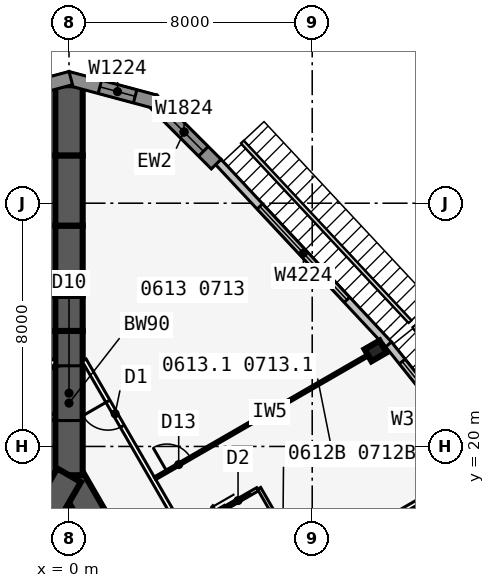
"""IFC4 building model, lengths in metres.
Left out: names, types, materials, properties, quantities, classifications, styles, units other than length and angle.
Written with IfcOpenShell. Run it as: python <this file> out.ifc"""

import sys

from ifc_helpers import new_model, si_unit, direction, frame, frame_2d, origin, origin_2d, place, context, subcontext, project, spatial, polyline, rectangle, i_section, outline, extrude, element, fill, save


model = new_model("IFC4")
c1 = context("Model", 3, precision=1e-05, world=origin(), true_north=direction((0.0, 1.0)))
c2 = subcontext(c1, "Body", "Model", "MODEL_VIEW")
j1 = project(units=[si_unit("LENGTHUNIT", "METRE"), si_unit("PLANEANGLEUNIT", "RADIAN")], contexts=[c1])
p1 = place(None, origin())
s1 = spatial("IfcSite", under=j1, at=p1, CompositionType="ELEMENT")
p2 = place(p1, origin())
s2 = spatial("IfcBuilding", under=s1, at=p2, CompositionType="ELEMENT")
p3 = place(p2, frame((0.0, 0.0, 31.9)))
s3 = spatial("IfcBuildingStorey", under=s2, at=p3, CompositionType="ELEMENT", Elevation=31.9)
p4 = place(p3, frame((16.5, -9.526, 0.0), z_axis=(0.0, 0.0, 1.0), x_axis=(-0.499999749417, 0.866025548458, 0.0)))
e1 = element("IfcWall", 1, at=p4, inside=s3, PredefinedType="SHEAR", context=c2, shape_type="SweptSolid", body=[
    extrude(rectangle(XDim=33.0, YDim=0.9, at=frame_2d((16.5, 0.0))), origin(), (0.0, 0.0, 1.0), 3.4),
])
p5 = place(p4, frame((14.15, 0.0, 0.0)))
e2 = element("IfcOpeningElement", 2, at=p5, cuts=e1, PredefinedType="OPENING", context=c2, shape_type="SweptSolid", body=[
    extrude(rectangle(XDim=1.8, YDim=2.13, at=frame_2d((0.9, 1.065))), frame((0.0, 0.46, 0.0), z_axis=(0.0, -1.0, 0.0), x_axis=(1.0, 0.0, 0.0)), (0.0, 0.0, 1.0), 0.92),
])
p6 = place(p4, frame((12.6, 0.0, 0.0)))
e3 = element("IfcOpeningElement", 3, at=p6, cuts=e1, PredefinedType="OPENING", context=c2, shape_type="SweptSolid", body=[
    extrude(rectangle(XDim=1.0, YDim=2.13, at=frame_2d((0.5, 1.065))), frame((0.0, 0.46, 0.0), z_axis=(0.0, -1.0, 0.0), x_axis=(1.0, 0.0, 0.0)), (0.0, 0.0, 1.0), 0.92),
])
p7 = place(p3, frame((0.0, 19.052, 0.0), z_axis=(0.0, 0.0, 1.0), x_axis=(-0.499999749417, -0.866025548458, 0.0)))
e4 = element("IfcWall", 4, at=p7, inside=s3, PredefinedType="SHEAR", context=c2, shape_type="SweptSolid", body=[
    extrude(rectangle(XDim=33.0, YDim=0.9, at=frame_2d((16.5, 0.0))), origin(), (0.0, 0.0, 1.0), 3.4),
])
p8 = place(p7, frame((14.15, 0.0, 0.0)))
e5 = element("IfcOpeningElement", 5, at=p8, cuts=e4, PredefinedType="OPENING", context=c2, shape_type="SweptSolid", body=[
    extrude(rectangle(XDim=1.8, YDim=2.13, at=frame_2d((0.9, 1.065))), frame((0.0, 0.46, 0.0), z_axis=(0.0, -1.0, 0.0), x_axis=(1.0, 0.0, 0.0)), (0.0, 0.0, 1.0), 0.92),
])
p9 = place(p7, frame((12.6, 0.0, 0.0)))
e6 = element("IfcOpeningElement", 6, at=p9, cuts=e4, PredefinedType="OPENING", context=c2, shape_type="SweptSolid", body=[
    extrude(rectangle(XDim=1.0, YDim=2.13, at=frame_2d((0.5, 1.065))), frame((0.0, 0.46, 0.0), z_axis=(0.0, -1.0, 0.0), x_axis=(1.0, 0.0, 0.0)), (0.0, 0.0, 1.0), 0.92),
])
p10 = place(p3, frame((0.0, 19.052, 0.0), z_axis=(0.0, 0.0, 1.0), x_axis=(0.0, 1.0, 0.0)))
e7 = element("IfcWall", 7, at=p10, inside=s3, PredefinedType="SHEAR", context=c2, shape_type="SweptSolid", body=[
    extrude(rectangle(XDim=4.746, YDim=0.9, at=frame_2d((2.373, 0.0))), origin(), (0.0, 0.0, 1.0), 3.4),
])
p11 = place(p10, frame((1.8, 0.0, 0.0)))
e8 = element("IfcOpeningElement", 8, at=p11, cuts=e7, PredefinedType="OPENING", context=c2, shape_type="SweptSolid", body=[
    extrude(rectangle(XDim=1.8, YDim=2.13, at=frame_2d((0.9, 1.065))), frame((0.0, 0.46, 0.0), z_axis=(0.0, -1.0, 0.0), x_axis=(1.0, 0.0, 0.0)), (0.0, 0.0, 1.0), 0.92),
])
p12 = place(p3, frame((0.0, 23.799, 0.0), z_axis=(0.0, 0.0, 1.0), x_axis=(0.0, 1.0, 0.0)))
e9 = element("IfcWall", 9, at=p12, inside=s3, PredefinedType="SHEAR", context=c2, shape_type="SweptSolid", body=[
    extrude(rectangle(XDim=1.155, YDim=0.9, at=frame_2d((0.577, 0.0))), origin(), (0.0, 0.0, 1.0), 3.4),
])
p13 = place(p3, frame((0.0, 24.953, 0.0), z_axis=(0.0, 0.0, 1.0), x_axis=(0.0, 1.0, 0.0)))
e10 = element("IfcWall", 10, at=p13, inside=s3, PredefinedType="SHEAR", context=c2, shape_type="SweptSolid", body=[
    extrude(rectangle(XDim=2.309, YDim=0.9, at=frame_2d((1.155, 0.0))), origin(), (0.0, 0.0, 1.0), 3.4),
])
p14 = place(p3, frame((0.0, 27.263, 0.0), z_axis=(0.0, 0.0, 1.0), x_axis=(0.0, 1.0, 0.0)))
e11 = element("IfcWall", 11, at=p14, inside=s3, PredefinedType="SHEAR", context=c2, shape_type="SweptSolid", body=[
    extrude(rectangle(XDim=2.31, YDim=0.9, at=frame_2d((1.155, 0.0))), origin(), (0.0, 0.0, 1.0), 3.4),
])
p15 = place(p3, frame((0.0, 29.572, 0.0), z_axis=(0.0, 0.0, 1.0), x_axis=(0.0, 1.0, 0.0)))
e12 = element("IfcWall", 12, at=p15, inside=s3, PredefinedType="SHEAR", context=c2, shape_type="SweptSolid", body=[
    extrude(rectangle(XDim=2.309, YDim=0.9, at=frame_2d((1.155, 0.0))), origin(), (0.0, 0.0, 1.0), 3.4),
])
p16 = place(p3, frame((10.083, 23.142, 0.0), z_axis=(0.0, 0.0, 1.0), x_axis=(-0.5, 0.866025403784, 0.0)))
e13 = element("IfcColumn", 13, at=p16, inside=s3, PredefinedType="COLUMN", context=c2, shape_type="SweptSolid", body=[
    extrude(i_section(OverallWidth=0.455, OverallDepth=0.569, WebThickness=0.078, FlangeThickness=0.125, at=origin_2d()), origin(), (0.0, 0.0, 1.0), 3.4),
])
p17 = place(p3, frame((13.664, 19.414, 0.0), z_axis=(0.0, 0.0, 1.0), x_axis=(-0.624594965756, 0.780948864364, 0.0)))
e14 = element("IfcWall", 14, at=p17, inside=s3, PredefinedType="STANDARD", context=c2, shape_type="SweptSolid", body=[
    extrude(rectangle(XDim=5.058, YDim=0.25, at=frame_2d((2.529, 0.0))), origin(), (0.0, 0.0, 1.0), 3.235),
])
p18 = place(p17, frame((0.729, 0.0, 0.45)))
e15 = element("IfcOpeningElement", 15, at=p18, cuts=e14, PredefinedType="OPENING", context=c2, shape_type="SweptSolid", body=[
    extrude(rectangle(XDim=3.6, YDim=2.4, at=frame_2d((1.8, 1.2))), frame((0.0, 0.135, 0.0), z_axis=(0.0, -1.0, 0.0), x_axis=(1.0, 0.0, 0.0)), (0.0, 0.0, 1.0), 0.27),
])
p19 = place(p3, frame((10.511, 23.357, 0.0), z_axis=(0.0, 0.0, 1.0), x_axis=(-0.682289646561, 0.731081964075, 0.0)))
e16 = element("IfcWall", 16, at=p19, inside=s3, PredefinedType="STANDARD", context=c2, shape_type="SweptSolid", body=[
    extrude(rectangle(XDim=8.211, YDim=0.25, at=frame_2d((4.105, 0.0))), origin(), (0.0, 0.0, 1.0), 3.235),
])
p20 = place(p19, frame((2.006, 0.0, 0.45)))
e17 = element("IfcOpeningElement", 17, at=p20, cuts=e16, PredefinedType="OPENING", context=c2, shape_type="SweptSolid", body=[
    extrude(rectangle(XDim=4.2, YDim=2.4, at=frame_2d((2.1, 1.2))), frame((0.0, 0.135, 0.0), z_axis=(0.0, -1.0, 0.0), x_axis=(1.0, 0.0, 0.0)), (0.0, 0.0, 1.0), 0.27),
])
p21 = place(p3, frame((4.841, 29.286, 0.0), z_axis=(0.0, 0.0, 1.0), x_axis=(-0.707106781187, 0.707106781187, 0.0)))
e18 = element("IfcWall", 18, at=p21, inside=s3, PredefinedType="SOLIDWALL", context=c2, shape_type="SweptSolid", body=[
    extrude(rectangle(XDim=2.988, YDim=0.45, at=frame_2d((1.494, 0.0))), origin(), (0.0, 0.0, 1.0), 3.235),
])
p22 = place(p21, frame((0.594, 0.0, 0.45)))
e19 = element("IfcOpeningElement", 19, at=p22, cuts=e18, PredefinedType="OPENING", context=c2, shape_type="SweptSolid", body=[
    extrude(rectangle(XDim=1.8, YDim=2.4, at=frame_2d((0.9, 1.2))), frame((0.0, 0.235, 0.0), z_axis=(0.0, -1.0, 0.0), x_axis=(1.0, 0.0, 0.0)), (0.0, 0.0, 1.0), 0.47),
])
p23 = place(p3, frame((2.829, 31.341, 0.0), z_axis=(0.0, 0.0, 1.0), x_axis=(-0.965930548995, 0.258801419081, 0.0)))
e20 = element("IfcWall", 20, at=p23, inside=s3, PredefinedType="SOLIDWALL", context=c2, shape_type="SweptSolid", body=[
    extrude(outline(polyline([(2.989, 0.225), (2.929, 0.225), (2.438, 0.093), (2.402, 0.225), (0.0, 0.225), (0.0, -0.225), (2.989, -0.225), (2.989, 0.225)])), origin(), (0.0, 0.0, 1.0), 3.235),
])
p24 = place(p23, frame((0.676, 0.0, 0.45)))
e21 = element("IfcOpeningElement", 21, at=p24, cuts=e20, PredefinedType="OPENING", context=c2, shape_type="SweptSolid", body=[
    extrude(rectangle(XDim=1.2, YDim=2.4, at=frame_2d((0.6, 1.2))), frame((0.0, 0.235, 0.0), z_axis=(0.0, -1.0, 0.0), x_axis=(1.0, 0.0, 0.0)), (0.0, 0.0, 1.0), 0.47),
])
p25 = place(p3, frame((0.058, 32.114, 0.0), z_axis=(0.0, 0.0, 1.0), x_axis=(-0.965930548995, -0.258801419081, 0.0)))
e22 = element("IfcWall", 22, at=p25, inside=s3, PredefinedType="SOLIDWALL", context=c2, shape_type="SweptSolid", body=[
    extrude(outline(polyline([(2.989, 0.225), (0.586, 0.225), (0.551, 0.093), (0.059, 0.225), (0.0, 0.225), (0.0, -0.225), (2.989, -0.225), (2.989, 0.225)])), origin(), (0.0, 0.0, 1.0), 3.235),
])
p26 = place(p25, frame((1.113, 0.0, 0.45)))
e23 = element("IfcOpeningElement", 23, at=p26, cuts=e22, PredefinedType="OPENING", context=c2, shape_type="SweptSolid", body=[
    extrude(rectangle(XDim=1.2, YDim=2.4, at=frame_2d((0.6, 1.2))), frame((0.0, 0.235, 0.0), z_axis=(0.0, -1.0, 0.0), x_axis=(1.0, 0.0, 0.0)), (0.0, 0.0, 1.0), 0.47),
])
p27 = place(p3, frame((20.027, -10.985, 0.0), z_axis=(0.0, 0.0, 1.0), x_axis=(-0.500001677587, 0.866024435227, 0.0)))
e24 = element("IfcWall", 24, at=p27, inside=s3, PredefinedType="PARTITIONING", context=c2, shape_type="SweptSolid", body=[
    extrude(rectangle(XDim=39.054, YDim=0.15, at=frame_2d((19.527, 0.0))), origin(), (0.0, 0.0, 1.0), 3.235),
])
p28 = place(p27, frame((0.352, 0.0, 0.0)))
e25 = element("IfcOpeningElement", 25, at=p28, cuts=e24, PredefinedType="OPENING", context=c2, shape_type="SweptSolid", body=[
    extrude(rectangle(XDim=0.95, YDim=2.13, at=frame_2d((0.475, 1.065))), frame((0.0, 0.085, 0.0), z_axis=(0.0, -1.0, 0.0), x_axis=(1.0, 0.0, 0.0)), (0.0, 0.0, 1.0), 0.17),
])
p29 = place(p27, frame((5.952, 0.0, 0.0)))
e26 = element("IfcOpeningElement", 26, at=p29, cuts=e24, PredefinedType="OPENING", context=c2, shape_type="SweptSolid", body=[
    extrude(rectangle(XDim=0.95, YDim=2.13, at=frame_2d((0.475, 1.065))), frame((0.0, 0.085, 0.0), z_axis=(0.0, -1.0, 0.0), x_axis=(1.0, 0.0, 0.0)), (0.0, 0.0, 1.0), 0.17),
])
p30 = place(p27, frame((12.152, 0.0, 0.0)))
e27 = element("IfcOpeningElement", 27, at=p30, cuts=e24, PredefinedType="OPENING", context=c2, shape_type="SweptSolid", body=[
    extrude(rectangle(XDim=0.95, YDim=2.13, at=frame_2d((0.475, 1.065))), frame((0.0, 0.085, 0.0), z_axis=(0.0, -1.0, 0.0), x_axis=(1.0, 0.0, 0.0)), (0.0, 0.0, 1.0), 0.17),
])
p31 = place(p27, frame((15.952, 0.0, 0.0)))
e28 = element("IfcOpeningElement", 28, at=p31, cuts=e24, PredefinedType="OPENING", context=c2, shape_type="SweptSolid", body=[
    extrude(rectangle(XDim=0.95, YDim=2.13, at=frame_2d((0.475, 1.065))), frame((0.0, 0.085, 0.0), z_axis=(0.0, -1.0, 0.0), x_axis=(1.0, 0.0, 0.0)), (0.0, 0.0, 1.0), 0.17),
])
p32 = place(p27, frame((22.152, 0.0, 0.0)))
e29 = element("IfcOpeningElement", 29, at=p32, cuts=e24, PredefinedType="OPENING", context=c2, shape_type="SweptSolid", body=[
    extrude(rectangle(XDim=0.95, YDim=2.13, at=frame_2d((0.475, 1.065))), frame((0.0, 0.085, 0.0), z_axis=(0.0, -1.0, 0.0), x_axis=(1.0, 0.0, 0.0)), (0.0, 0.0, 1.0), 0.17),
])
p33 = place(p27, frame((25.952, 0.0, 0.0)))
e30 = element("IfcOpeningElement", 30, at=p33, cuts=e24, PredefinedType="OPENING", context=c2, shape_type="SweptSolid", body=[
    extrude(rectangle(XDim=0.95, YDim=2.13, at=frame_2d((0.475, 1.065))), frame((0.0, 0.085, 0.0), z_axis=(0.0, -1.0, 0.0), x_axis=(1.0, 0.0, 0.0)), (0.0, 0.0, 1.0), 0.17),
])
p34 = place(p27, frame((36.546, 0.0, 0.0)))
e31 = element("IfcOpeningElement", 31, at=p34, cuts=e24, PredefinedType="OPENING", context=c2, shape_type="SweptSolid", body=[
    extrude(rectangle(XDim=0.95, YDim=2.13, at=frame_2d((0.475, 1.065))), frame((0.0, 0.085, 0.0), z_axis=(0.0, -1.0, 0.0), x_axis=(1.0, 0.0, 0.0)), (0.0, 0.0, 1.0), 0.17),
])
p35 = place(p3, frame((5.329, 14.623, 0.0), z_axis=(0.0, 0.0, 1.0), x_axis=(0.866018409083, 0.500012114982, 0.0)))
e32 = element("IfcWall", 32, at=p35, inside=s3, PredefinedType="PARTITIONING", context=c2, shape_type="SweptSolid", body=[
    extrude(rectangle(XDim=9.485, YDim=0.15, at=frame_2d((4.742, 0.0))), origin(), (0.0, 0.0, 1.0), 2.389),
])
p36 = place(p3, frame((2.829, 18.954, 0.0), z_axis=(0.0, 0.0, 1.0), x_axis=(0.866020536561, 0.500008430184, 0.0)))
e33 = element("IfcWall", 33, at=p36, inside=s3, PredefinedType="PARTITIONING", context=c2, shape_type="SweptSolid", body=[
    extrude(rectangle(XDim=8.72, YDim=0.1, at=frame_2d((4.36, 0.0))), origin(), (0.0, 0.0, 1.0), 2.389),
])
p37 = place(p36, frame((0.45, 0.0, 0.0)))
e34 = element("IfcOpeningElement", 34, at=p37, cuts=e33, PredefinedType="OPENING", context=c2, shape_type="SweptSolid", body=[
    extrude(rectangle(XDim=0.9, YDim=2.13, at=frame_2d((0.45, 1.065))), frame((0.0, 0.06, 0.0), z_axis=(0.0, -1.0, 0.0), x_axis=(1.0, 0.0, 0.0)), (0.0, 0.0, 1.0), 0.12),
])
p38 = place(p3, frame((7.753, 16.023, 0.0), z_axis=(0.0, 0.0, 1.0), x_axis=(-0.499990139034, 0.866031096941, 0.0)))
e35 = element("IfcWall", 35, at=p38, inside=s3, PredefinedType="PLUMBINGWALL", context=c2, shape_type="SweptSolid", body=[
    extrude(rectangle(XDim=3.0, YDim=0.12, at=frame_2d((1.5, 0.0))), origin(), (0.0, 0.0, 1.0), 3.235),
])
p39 = place(p3, frame((3.829, 17.221, 0.0), z_axis=(0.0, 0.0, 1.0), x_axis=(0.865997131366, 0.500048966069, 0.0)))
e36 = element("IfcWall", 36, at=p39, inside=s3, PredefinedType="PLUMBINGWALL", context=c2, shape_type="SweptSolid", body=[
    extrude(rectangle(XDim=2.74, YDim=0.12, at=frame_2d((1.37, 0.0))), origin(), (0.0, 0.0, 1.0), 3.235),
])
p40 = place(p39, frame((1.55, 0.0, 0.0)))
e37 = element("IfcOpeningElement", 37, at=p40, cuts=e36, PredefinedType="OPENING", context=c2, shape_type="SweptSolid", body=[
    extrude(rectangle(XDim=0.9, YDim=2.13, at=frame_2d((0.45, 1.065))), frame((0.0, 0.07, 0.0), z_axis=(0.0, -1.0, 0.0), x_axis=(1.0, 0.0, 0.0)), (0.0, 0.0, 1.0), 0.14),
])
p41 = place(p3, frame((-0.5, 22.836, 0.0), z_axis=(0.0, 0.0, 1.0), x_axis=(-0.500001677587, -0.866024435227, 0.0)))
e38 = element("IfcWall", 38, at=p41, inside=s3, PredefinedType="PARTITIONING", context=c2, shape_type="SweptSolid", body=[
    extrude(rectangle(XDim=39.054, YDim=0.15, at=frame_2d((19.527, 0.0))), origin(), (0.0, 0.0, 1.0), 3.235),
])
p42 = place(p41, frame((1.558, 0.0, 0.0)))
e39 = element("IfcOpeningElement", 39, at=p42, cuts=e38, PredefinedType="OPENING", context=c2, shape_type="SweptSolid", body=[
    extrude(rectangle(XDim=0.95, YDim=2.13, at=frame_2d((0.475, 1.065))), frame((0.0, 0.085, 0.0), z_axis=(0.0, -1.0, 0.0), x_axis=(1.0, 0.0, 0.0)), (0.0, 0.0, 1.0), 0.17),
])
p43 = place(p41, frame((15.352, 0.0, 0.0)))
e40 = element("IfcOpeningElement", 40, at=p43, cuts=e38, PredefinedType="OPENING", context=c2, shape_type="SweptSolid", body=[
    extrude(rectangle(XDim=0.95, YDim=2.13, at=frame_2d((0.475, 1.065))), frame((0.0, 0.085, 0.0), z_axis=(0.0, -1.0, 0.0), x_axis=(1.0, 0.0, 0.0)), (0.0, 0.0, 1.0), 0.17),
])
p44 = place(p41, frame((22.752, 0.0, 0.0)))
e41 = element("IfcOpeningElement", 41, at=p44, cuts=e38, PredefinedType="OPENING", context=c2, shape_type="SweptSolid", body=[
    extrude(rectangle(XDim=0.95, YDim=2.13, at=frame_2d((0.475, 1.065))), frame((0.0, 0.085, 0.0), z_axis=(0.0, -1.0, 0.0), x_axis=(1.0, 0.0, 0.0)), (0.0, 0.0, 1.0), 0.17),
])
p45 = place(p41, frame((30.952, 0.0, 0.0)))
e42 = element("IfcOpeningElement", 42, at=p45, cuts=e38, PredefinedType="OPENING", context=c2, shape_type="SweptSolid", body=[
    extrude(rectangle(XDim=0.95, YDim=2.13, at=frame_2d((0.475, 1.065))), frame((0.0, 0.085, 0.0), z_axis=(0.0, -1.0, 0.0), x_axis=(1.0, 0.0, 0.0)), (0.0, 0.0, 1.0), 0.17),
])
p46 = place(p41, frame((37.752, 0.0, 0.0)))
e43 = element("IfcOpeningElement", 43, at=p46, cuts=e38, PredefinedType="OPENING", context=c2, shape_type="SweptSolid", body=[
    extrude(rectangle(XDim=0.95, YDim=2.13, at=frame_2d((0.475, 1.065))), frame((0.0, 0.085, 0.0), z_axis=(0.0, -1.0, 0.0), x_axis=(1.0, 0.0, 0.0)), (0.0, 0.0, 1.0), 0.17),
])
p47 = place(p18, origin())
e44 = element("IfcWindow", 44, at=p47, inside=s3, PartitioningType="SINGLE_PANEL", PredefinedType="WINDOW", context=c2, shape_type="SweptSolid", body=[
    extrude(rectangle(XDim=3.6, YDim=2.4, at=frame_2d((1.8, 1.2))), frame((0.0, 0.03, 0.0), z_axis=(0.0, -1.0, 0.0), x_axis=(1.0, 0.0, 0.0)), (0.0, 0.0, 1.0), 0.06),
])
fill(e15, e44)
p48 = place(p20, origin())
e45 = element("IfcWindow", 45, at=p48, inside=s3, PartitioningType="SINGLE_PANEL", PredefinedType="WINDOW", context=c2, shape_type="SweptSolid", body=[
    extrude(rectangle(XDim=4.2, YDim=2.4, at=frame_2d((2.1, 1.2))), frame((0.0, 0.03, 0.0), z_axis=(0.0, -1.0, 0.0), x_axis=(1.0, 0.0, 0.0)), (0.0, 0.0, 1.0), 0.06),
])
fill(e17, e45)
p49 = place(p22, origin())
e46 = element("IfcWindow", 46, at=p49, inside=s3, PartitioningType="SINGLE_PANEL", PredefinedType="WINDOW", context=c2, shape_type="SweptSolid", body=[
    extrude(rectangle(XDim=1.8, YDim=2.4, at=frame_2d((0.9, 1.2))), frame((0.0, 0.03, 0.0), z_axis=(0.0, -1.0, 0.0), x_axis=(1.0, 0.0, 0.0)), (0.0, 0.0, 1.0), 0.06),
])
fill(e19, e46)
p50 = place(p24, origin())
e47 = element("IfcWindow", 47, at=p50, inside=s3, PartitioningType="SINGLE_PANEL", PredefinedType="WINDOW", context=c2, shape_type="SweptSolid", body=[
    extrude(rectangle(XDim=1.2, YDim=2.4, at=frame_2d((0.6, 1.2))), frame((0.0, 0.03, 0.0), z_axis=(0.0, -1.0, 0.0), x_axis=(1.0, 0.0, 0.0)), (0.0, 0.0, 1.0), 0.06),
])
fill(e21, e47)
p51 = place(p37, origin())
e48 = element("IfcDoor", 48, at=p51, inside=s3, OperationType="SINGLE_SWING_LEFT", PredefinedType="DOOR", context=c2, shape_type="SweptSolid", body=[
    extrude(rectangle(XDim=0.9, YDim=2.13, at=frame_2d((0.45, 1.065))), frame((0.0, 0.025, 0.0), z_axis=(0.0, -1.0, 0.0), x_axis=(1.0, 0.0, 0.0)), (0.0, 0.0, 1.0), 0.05),
])
fill(e34, e48)
p52 = place(p40, origin())
e49 = element("IfcDoor", 49, at=p52, inside=s3, OperationType="SLIDING_TO_LEFT", PredefinedType="DOOR", context=c2, shape_type="SweptSolid", body=[
    extrude(rectangle(XDim=0.9, YDim=2.13, at=frame_2d((0.45, 1.065))), frame((0.0, 0.025, 0.0), z_axis=(0.0, -1.0, 0.0), x_axis=(1.0, 0.0, 0.0)), (0.0, 0.0, 1.0), 0.05),
])
fill(e37, e49)
p53 = place(p34, origin())
e50 = element("IfcDoor", 50, at=p53, inside=s3, OperationType="SINGLE_SWING_RIGHT", PredefinedType="DOOR", context=c2, shape_type="SweptSolid", body=[
    extrude(rectangle(XDim=0.95, YDim=2.13, at=frame_2d((0.475, 1.065))), frame((0.0, 0.025, 0.0), z_axis=(0.0, -1.0, 0.0), x_axis=(1.0, 0.0, 0.0)), (0.0, 0.0, 1.0), 0.05),
])
fill(e31, e50)
p54 = place(p11, origin())
e51 = element("IfcDoor", 51, at=p54, inside=s3, OperationType="DOUBLE_DOOR_DOUBLE_SWING", PredefinedType="DOOR", context=c2, shape_type="SweptSolid", body=[
    extrude(rectangle(XDim=1.8, YDim=2.13, at=frame_2d((0.9, 1.065))), frame((0.0, 0.025, 0.0), z_axis=(0.0, -1.0, 0.0), x_axis=(1.0, 0.0, 0.0)), (0.0, 0.0, 1.0), 0.05),
])
fill(e8, e51)
save(model, sys.argv[1])
